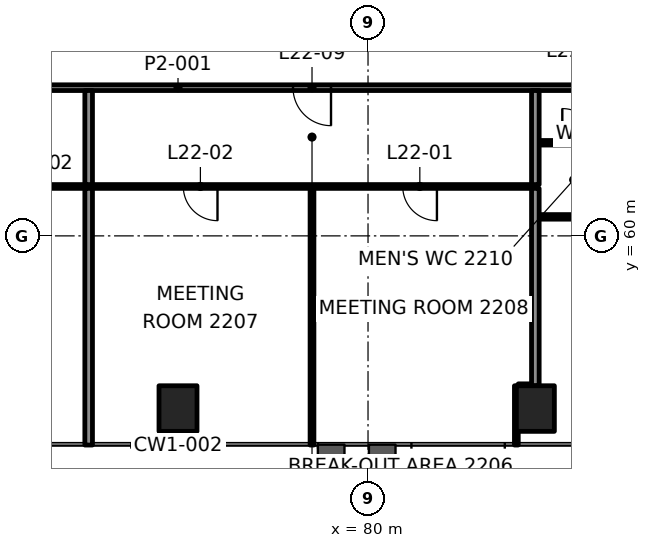
"""IFC4 building model, lengths in metres.
Left out: names, types, materials, properties, quantities, classifications, styles, units other than length and angle.
Written with IfcOpenShell. Run it as: python <this file> out.ifc"""

import sys

from ifc_helpers import new_model, si_unit, direction, frame, frame_2d, origin, origin_2d, place, context, subcontext, project, spatial, rectangle, extrude, element, fill, save


model = new_model("IFC4")
c1 = context("Model", 3, precision=1e-05, world=origin(), true_north=direction((0.0, 1.0)))
c2 = subcontext(c1, "Body", "Model", "MODEL_VIEW")
j1 = project(units=[si_unit("LENGTHUNIT", "METRE"), si_unit("PLANEANGLEUNIT", "RADIAN")], contexts=[c1])
p1 = place(None, origin())
s1 = spatial("IfcSite", under=j1, at=p1, CompositionType="ELEMENT")
p2 = place(p1, origin())
s2 = spatial("IfcBuilding", under=s1, at=p2, CompositionType="ELEMENT")
p3 = place(p2, frame((0.0, 0.0, 98.8)))
s3 = spatial("IfcBuildingStorey", under=s2, at=p3, CompositionType="ELEMENT", Elevation=98.8)
for number, where, z_axis, x_axis in (
    (1, (75.0, 55.456, -0.0), (0.0, 0.0, 1.0), (1.0, 0.0, 0.0)),
    (2, (84.403, 55.456, -0.0), (0.0, 0.0, 1.0), (1.0, 0.0, 0.0)),
):
    element("IfcColumn", number, at=place(p3, frame(where, z_axis=z_axis, x_axis=x_axis)), inside=s3, PredefinedType="COLUMN", context=c2, shape_type="SweptSolid", body=[
        extrude(rectangle(XDim=1.0, YDim=1.2, at=origin_2d()), origin(), (0.0, 0.0, 1.0), 4.2),
    ])
p4 = place(p3, frame((83.954, 56.056, 0.0), z_axis=(0.0, 0.0, 1.0), x_axis=(1.0, 0.0, 0.0)))
e3 = element("IfcWall", 3, at=p4, inside=s3, PredefinedType="PARTITIONING", context=c2, shape_type="SweptSolid", body=[
    extrude(rectangle(XDim=0.349, YDim=0.1, at=frame_2d((0.174, 0.0))), origin(), (0.0, 0.0, 1.0), 3.4),
])
p5 = place(p3, frame((84.504, 60.5, 0.0), z_axis=(0.0, 0.0, 1.0), x_axis=(1.0, 0.0, 0.0)))
e4 = element("IfcWall", 4, at=p5, inside=s3, PredefinedType="PARTITIONING", context=c2, shape_type="SweptSolid", body=[
    extrude(rectangle(XDim=6.951, YDim=0.12, at=frame_2d((3.476, 0.0))), origin(), (0.0, 0.0, 1.0), 3.4),
])
p6 = place(p3, frame((84.403, 61.3, 0.0), z_axis=(0.0, 0.0, 1.0), x_axis=(-1.0, 0.0, 0.0)))
e5 = element("IfcWall", 5, at=p6, inside=s3, PredefinedType="PARTITIONING", context=c2, shape_type="SweptSolid", body=[
    extrude(rectangle(XDim=26.132, YDim=0.1, at=frame_2d((13.066, 0.0))), origin(), (0.0, 0.0, 1.0), 3.4),
])
p7 = place(p6, frame((2.59, 0.0, 0.0)))
e6 = element("IfcOpeningElement", 6, at=p7, cuts=e5, PredefinedType="OPENING", context=c2, shape_type="SweptSolid", body=[
    extrude(rectangle(XDim=0.9, YDim=2.1, at=frame_2d((0.45, 1.05))), frame((0.0, 0.06, 0.0), z_axis=(0.0, -1.0, 0.0), x_axis=(1.0, 0.0, 0.0)), (0.0, 0.0, 1.0), 0.12),
])
p8 = place(p6, frame((8.364, 0.0, 0.0)))
e7 = element("IfcOpeningElement", 7, at=p8, cuts=e5, PredefinedType="OPENING", context=c2, shape_type="SweptSolid", body=[
    extrude(rectangle(XDim=0.9, YDim=2.1, at=frame_2d((0.45, 1.05))), frame((0.0, 0.06, 0.0), z_axis=(0.0, -1.0, 0.0), x_axis=(1.0, 0.0, 0.0)), (0.0, 0.0, 1.0), 0.12),
])
p9 = place(p6, frame((15.956, 0.0, 0.0)))
e8 = element("IfcOpeningElement", 8, at=p9, cuts=e5, PredefinedType="OPENING", context=c2, shape_type="SweptSolid", body=[
    extrude(rectangle(XDim=1.0, YDim=2.1, at=frame_2d((0.5, 1.05))), frame((0.0, 0.06, 0.0), z_axis=(0.0, -1.0, 0.0), x_axis=(1.0, 0.0, 0.0)), (0.0, 0.0, 1.0), 0.12),
])
p10 = place(p6, frame((23.045, 0.0, 0.0)))
e9 = element("IfcOpeningElement", 9, at=p10, cuts=e5, PredefinedType="OPENING", context=c2, shape_type="SweptSolid", body=[
    extrude(rectangle(XDim=1.0, YDim=2.1, at=frame_2d((0.5, 1.05))), frame((0.0, 0.06, 0.0), z_axis=(0.0, -1.0, 0.0), x_axis=(1.0, 0.0, 0.0)), (0.0, 0.0, 1.0), 0.12),
])
p11 = place(p3, frame((84.503, 62.45, 0.0), z_axis=(0.0, 0.0, 1.0), x_axis=(1.0, 0.0, 0.0)))
e10 = element("IfcWall", 10, at=p11, inside=s3, PredefinedType="PARTITIONING", context=c2, shape_type="SweptSolid", body=[
    extrude(rectangle(XDim=6.952, YDim=0.12, at=frame_2d((3.476, 0.0))), origin(), (0.0, 0.0, 1.0), 3.4),
])
p12 = place(p11, frame((0.609, 0.0, 0.0)))
e11 = element("IfcOpeningElement", 11, at=p12, cuts=e10, PredefinedType="OPENING", context=c2, shape_type="SweptSolid", body=[
    extrude(rectangle(XDim=0.9, YDim=2.1, at=frame_2d((0.45, 1.05))), frame((0.0, 0.07, 0.0), z_axis=(0.0, -1.0, 0.0), x_axis=(1.0, 0.0, 0.0)), (0.0, 0.0, 1.0), 0.14),
])
p13 = place(p11, frame((2.472, 0.0, 0.0)))
e12 = element("IfcOpeningElement", 12, at=p13, cuts=e10, PredefinedType="OPENING", context=c2, shape_type="SweptSolid", body=[
    extrude(rectangle(XDim=0.9, YDim=2.1, at=frame_2d((0.45, 1.05))), frame((0.0, 0.07, 0.0), z_axis=(0.0, -1.0, 0.0), x_axis=(1.0, 0.0, 0.0)), (0.0, 0.0, 1.0), 0.14),
])
p14 = place(p11, frame((4.84, 0.0, 0.0)))
e13 = element("IfcOpeningElement", 13, at=p14, cuts=e10, PredefinedType="OPENING", context=c2, shape_type="SweptSolid", body=[
    extrude(rectangle(XDim=1.0, YDim=2.1, at=frame_2d((0.5, 1.05))), frame((0.0, 0.07, 0.0), z_axis=(0.0, -1.0, 0.0), x_axis=(1.0, 0.0, 0.0)), (0.0, 0.0, 1.0), 0.14),
])
p15 = place(p3, frame((90.1, 63.9, 0.0), z_axis=(0.0, 0.0, 1.0), x_axis=(-1.0, 0.0, 0.0)))
e14 = element("IfcWall", 14, at=p15, inside=s3, PredefinedType="PARTITIONING", context=c2, shape_type="SweptSolid", body=[
    extrude(rectangle(XDim=30.2, YDim=0.15, at=frame_2d((15.1, 0.0))), origin(), (0.0, 0.0, 1.0), 3.4),
])
p16 = place(p15, frame((2.35, 0.0, 0.0)))
e15 = element("IfcOpeningElement", 15, at=p16, cuts=e14, PredefinedType="OPENING", context=c2, shape_type="SweptSolid", body=[
    extrude(rectangle(XDim=1.2, YDim=2.1, at=frame_2d((0.6, 1.05))), frame((0.0, 0.085, 0.0), z_axis=(0.0, -1.0, 0.0), x_axis=(1.0, 0.0, 0.0)), (0.0, 0.0, 1.0), 0.17),
])
p17 = place(p15, frame((11.074, 0.0, 0.0)))
e16 = element("IfcOpeningElement", 16, at=p17, cuts=e14, PredefinedType="OPENING", context=c2, shape_type="SweptSolid", body=[
    extrude(rectangle(XDim=1.0, YDim=2.1, at=frame_2d((0.5, 1.05))), frame((0.0, 0.085, 0.0), z_axis=(0.0, -1.0, 0.0), x_axis=(1.0, 0.0, 0.0)), (0.0, 0.0, 1.0), 0.17),
])
p18 = place(p15, frame((21.653, 0.0, 0.0)))
e17 = element("IfcOpeningElement", 17, at=p18, cuts=e14, PredefinedType="OPENING", context=c2, shape_type="SweptSolid", body=[
    extrude(rectangle(XDim=1.0, YDim=2.1, at=frame_2d((0.5, 1.05))), frame((0.0, 0.085, 0.0), z_axis=(0.0, -1.0, 0.0), x_axis=(1.0, 0.0, 0.0)), (0.0, 0.0, 1.0), 0.17),
])
p19 = place(p15, frame((27.925, 0.0, 0.0)))
e18 = element("IfcOpeningElement", 18, at=p19, cuts=e14, PredefinedType="OPENING", context=c2, shape_type="SweptSolid", body=[
    extrude(rectangle(XDim=1.0, YDim=2.1, at=frame_2d((0.5, 1.05))), frame((0.0, 0.085, 0.0), z_axis=(0.0, -1.0, 0.0), x_axis=(1.0, 0.0, 0.0)), (0.0, 0.0, 1.0), 0.17),
])
p20 = place(p3, frame((84.403, 56.056, 0.0), z_axis=(0.0, 0.0, 1.0), x_axis=(0.0, 1.0, 0.0)))
e19 = element("IfcWall", 19, at=p20, inside=s3, PredefinedType="PARTITIONING", context=c2, shape_type="SweptSolid", body=[
    extrude(rectangle(XDim=5.194, YDim=0.2, at=frame_2d((2.597, 0.0))), origin(), (0.0, 0.0, 1.0), 3.4),
])
p21 = place(p3, frame((83.903, 54.496, 0.0), z_axis=(0.0, 0.0, 1.0), x_axis=(0.0, 1.0, 0.0)))
e20 = element("IfcWall", 20, at=p21, inside=s3, PredefinedType="PARTITIONING", context=c2, shape_type="SweptSolid", body=[
    extrude(rectangle(XDim=1.56, YDim=0.1, at=frame_2d((0.78, 0.0))), origin(), (0.0, 0.0, 1.0), 3.165),
])
p22 = place(p3, frame((78.526, 54.496, 0.0), z_axis=(0.0, 0.0, 1.0), x_axis=(0.0, 1.0, 0.0)))
e21 = element("IfcWall", 21, at=p22, inside=s3, PredefinedType="PARTITIONING", context=c2, shape_type="SweptSolid", body=[
    extrude(rectangle(XDim=6.754, YDim=0.1, at=frame_2d((3.377, 0.0))), origin(), (0.0, 0.0, 1.0), 3.165),
])
p23 = place(p3, frame((72.649, 54.496, 0.0), z_axis=(0.0, 0.0, 1.0), x_axis=(0.0, 1.0, 0.0)))
e22 = element("IfcWall", 22, at=p23, inside=s3, PredefinedType="PARTITIONING", context=c2, shape_type="SweptSolid", body=[
    extrude(rectangle(XDim=6.754, YDim=0.2, at=frame_2d((3.377, 0.0))), origin(), (0.0, 0.0, 1.0), 3.165),
])
for number, where, z_axis, x_axis in (
    (23, (84.403, 61.35, 0.0), (0.0, 0.0, 1.0), (0.0, 1.0, 0.0)),
    (24, (72.649, 61.35, 0.0), (0.0, 0.0, 1.0), (0.0, 1.0, 0.0)),
):
    element("IfcWall", number, at=place(p3, frame(where, z_axis=z_axis, x_axis=x_axis)), inside=s3, PredefinedType="PARTITIONING", context=c2, shape_type="SweptSolid", body=[
        extrude(rectangle(XDim=2.475, YDim=0.2, at=frame_2d((1.237, 0.0))), origin(), (0.0, 0.0, 1.0), 3.4),
    ])
p24 = place(p7, origin())
e25 = element("IfcDoor", 25, at=p24, inside=s3, OperationType="SINGLE_SWING_RIGHT", PredefinedType="DOOR", context=c2, shape_type="SweptSolid", body=[
    extrude(rectangle(XDim=0.9, YDim=2.1, at=frame_2d((0.45, 1.05))), frame((0.0, 0.025, 0.0), z_axis=(0.0, -1.0, 0.0), x_axis=(1.0, 0.0, 0.0)), (0.0, 0.0, 1.0), 0.05),
])
fill(e6, e25)
p25 = place(p8, origin())
e26 = element("IfcDoor", 26, at=p25, inside=s3, OperationType="SINGLE_SWING_LEFT", PredefinedType="DOOR", context=c2, shape_type="SweptSolid", body=[
    extrude(rectangle(XDim=0.9, YDim=2.1, at=frame_2d((0.45, 1.05))), frame((0.0, 0.025, 0.0), z_axis=(0.0, -1.0, 0.0), x_axis=(1.0, 0.0, 0.0)), (0.0, 0.0, 1.0), 0.05),
])
fill(e7, e26)
p26 = place(p12, origin())
e27 = element("IfcDoor", 27, at=p26, inside=s3, OperationType="SINGLE_SWING_LEFT", PredefinedType="DOOR", context=c2, shape_type="SweptSolid", body=[
    extrude(rectangle(XDim=0.9, YDim=2.1, at=frame_2d((0.45, 1.05))), frame((0.0, 0.025, 0.0), z_axis=(0.0, -1.0, 0.0), x_axis=(1.0, 0.0, 0.0)), (0.0, 0.0, 1.0), 0.05),
])
fill(e11, e27)
p27 = place(p17, origin())
e28 = element("IfcDoor", 28, at=p27, inside=s3, OperationType="SINGLE_SWING_RIGHT", PredefinedType="DOOR", context=c2, shape_type="SweptSolid", body=[
    extrude(rectangle(XDim=1.0, YDim=2.1, at=frame_2d((0.5, 1.05))), frame((0.0, 0.025, 0.0), z_axis=(0.0, -1.0, 0.0), x_axis=(1.0, 0.0, 0.0)), (0.0, 0.0, 1.0), 0.05),
])
fill(e16, e28)
save(model, sys.argv[1])
